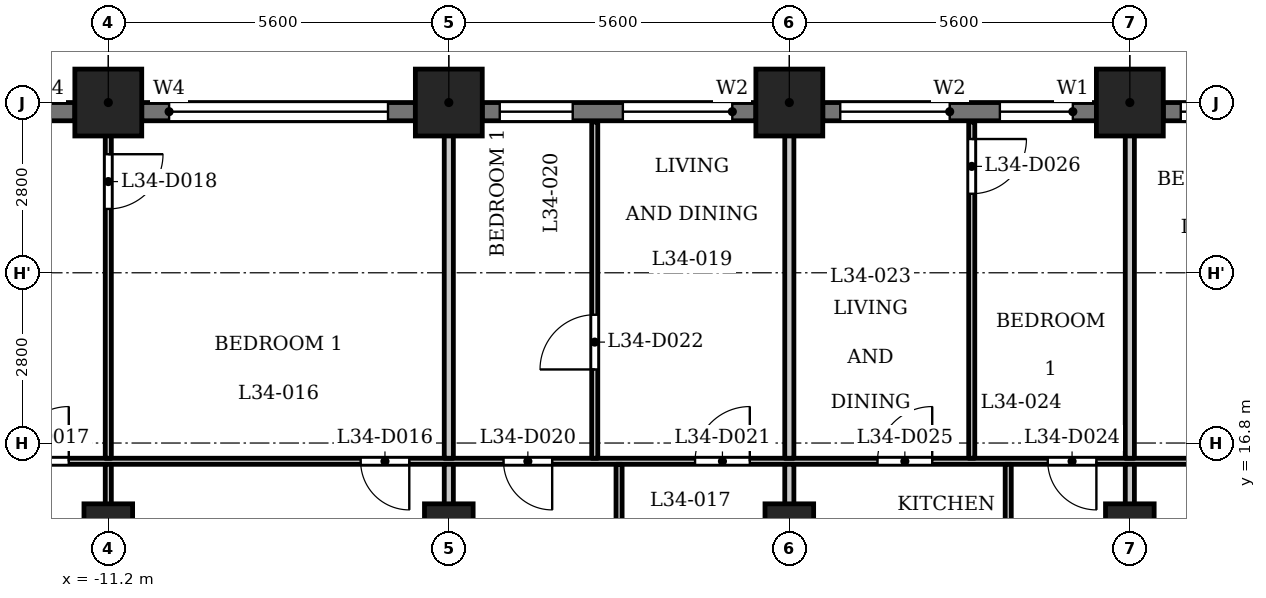
"""IFC4 building model, lengths in metres.
Left out: names, types, materials, properties, quantities, classifications, styles, units other than length and angle.
Written with IfcOpenShell. Run it as: python <this file> out.ifc"""

import sys

from ifc_helpers import new_model, si_unit, direction, frame, frame_2d, origin, origin_2d, place, context, subcontext, project, spatial, rectangle, extrude, element, fill, save


model = new_model("IFC4")
c1 = context("Model", 3, precision=1e-05, world=origin(), true_north=direction((0.0, 1.0)))
c2 = subcontext(c1, "Body", "Model", "MODEL_VIEW")
j1 = project(units=[si_unit("LENGTHUNIT", "METRE"), si_unit("PLANEANGLEUNIT", "RADIAN")], contexts=[c1])
p1 = place(None, origin())
s1 = spatial("IfcSite", under=j1, at=p1, CompositionType="ELEMENT")
p2 = place(p1, origin())
s2 = spatial("IfcBuilding", under=s1, at=p2, CompositionType="ELEMENT")
p3 = place(p2, frame((0.0, 0.0, 136.1)))
s3 = spatial("IfcBuildingStorey", under=s2, at=p3, CompositionType="ELEMENT", Elevation=136.1)
for number, where, z_axis, x_axis in (
    (1, (5.6, 22.4, 0.0), (0.0, 0.0, 1.0), (1.0, 0.0, 0.0)),
    (2, (0.0, 22.4, 0.0), (0.0, 0.0, 1.0), (1.0, 0.0, 0.0)),
    (3, (-5.6, 22.4, 0.0), (0.0, 0.0, 1.0), (1.0, 0.0, 0.0)),
    (4, (-11.2, 22.4, 0.0), (0.0, 0.0, 1.0), (1.0, 0.0, 0.0)),
):
    element("IfcColumn", number, at=place(p3, frame(where, z_axis=z_axis, x_axis=x_axis)), inside=s3, PredefinedType="COLUMN", context=c2, shape_type="SweptSolid", body=[
        extrude(rectangle(XDim=1.1, YDim=1.1, at=origin_2d()), origin(), (0.0, 0.0, 1.0), 3.5),
    ])
for number, where, z_axis, x_axis in (
    (5, (-11.2, 15.4, 0.0), (0.0, 0.0, 1.0), (1.0, 0.0, 0.0)),
    (6, (-5.6, 15.4, 0.0), (0.0, 0.0, 1.0), (1.0, 0.0, 0.0)),
    (7, (0.0, 15.4, 0.0), (0.0, 0.0, 1.0), (1.0, 0.0, 0.0)),
    (8, (5.6, 15.4, 0.0), (0.0, 0.0, 1.0), (1.0, 0.0, 0.0)),
):
    element("IfcColumn", number, at=place(p3, frame(where, z_axis=z_axis, x_axis=x_axis)), inside=s3, PredefinedType="COLUMN", context=c2, shape_type="SweptSolid", body=[
        extrude(rectangle(XDim=0.8, YDim=0.8, at=origin_2d()), origin(), (0.0, 0.0, 1.0), 3.5),
    ])
p4 = place(p3, frame((10.65, 22.25, 0.0), z_axis=(0.0, 0.0, 1.0), x_axis=(-1.0, 0.0, 0.0)))
e9 = element("IfcWall", 9, at=p4, inside=s3, PredefinedType="SOLIDWALL", context=c2, shape_type="SweptSolid", body=[
    extrude(rectangle(XDim=4.5, YDim=0.3, at=frame_2d((2.25, 0.0))), origin(), (0.0, 0.0, 1.0), 2.45),
])
p5 = place(p4, frame((0.387, 0.0, 0.6)))
e10 = element("IfcOpeningElement", 10, at=p5, cuts=e9, PredefinedType="OPENING", context=c2, shape_type="SweptSolid", body=[
    extrude(rectangle(XDim=1.2, YDim=1.55, at=frame_2d((0.6, 0.775))), frame((0.0, 0.16, 0.0), z_axis=(0.0, -1.0, 0.0), x_axis=(1.0, 0.0, 0.0)), (0.0, 0.0, 1.0), 0.32),
])
p6 = place(p4, frame((2.413, 0.0, 0.9)))
e11 = element("IfcOpeningElement", 11, at=p6, cuts=e9, PredefinedType="OPENING", context=c2, shape_type="SweptSolid", body=[
    extrude(rectangle(XDim=1.8, YDim=1.25, at=frame_2d((0.9, 0.625))), frame((0.0, 0.16, 0.0), z_axis=(0.0, -1.0, 0.0), x_axis=(1.0, 0.0, 0.0)), (0.0, 0.0, 1.0), 0.32),
])
p7 = place(p3, frame((5.05, 22.25, 0.0), z_axis=(0.0, 0.0, 1.0), x_axis=(-1.0, 0.0, 0.0)))
e12 = element("IfcWall", 12, at=p7, inside=s3, PredefinedType="SOLIDWALL", context=c2, shape_type="SweptSolid", body=[
    extrude(rectangle(XDim=4.5, YDim=0.3, at=frame_2d((2.25, 0.0))), origin(), (0.0, 0.0, 1.0), 2.45),
])
p8 = place(p7, frame((0.387, 0.0, 0.6)))
e13 = element("IfcOpeningElement", 13, at=p8, cuts=e12, PredefinedType="OPENING", context=c2, shape_type="SweptSolid", body=[
    extrude(rectangle(XDim=1.2, YDim=1.55, at=frame_2d((0.6, 0.775))), frame((0.0, 0.16, 0.0), z_axis=(0.0, -1.0, 0.0), x_axis=(1.0, 0.0, 0.0)), (0.0, 0.0, 1.0), 0.32),
])
p9 = place(p7, frame((2.413, 0.0, 0.9)))
e14 = element("IfcOpeningElement", 14, at=p9, cuts=e12, PredefinedType="OPENING", context=c2, shape_type="SweptSolid", body=[
    extrude(rectangle(XDim=1.8, YDim=1.25, at=frame_2d((0.9, 0.625))), frame((0.0, 0.16, 0.0), z_axis=(0.0, -1.0, 0.0), x_axis=(1.0, 0.0, 0.0)), (0.0, 0.0, 1.0), 0.32),
])
p10 = place(p3, frame((-0.55, 22.25, 0.0), z_axis=(0.0, 0.0, 1.0), x_axis=(-1.0, 0.0, 0.0)))
e15 = element("IfcWall", 15, at=p10, inside=s3, PredefinedType="SOLIDWALL", context=c2, shape_type="SweptSolid", body=[
    extrude(rectangle(XDim=4.5, YDim=0.3, at=frame_2d((2.25, 0.0))), origin(), (0.0, 0.0, 1.0), 2.45),
])
p11 = place(p10, frame((0.387, 0.0, 0.9)))
e16 = element("IfcOpeningElement", 16, at=p11, cuts=e15, PredefinedType="OPENING", context=c2, shape_type="SweptSolid", body=[
    extrude(rectangle(XDim=1.8, YDim=1.25, at=frame_2d((0.9, 0.625))), frame((0.0, 0.16, 0.0), z_axis=(0.0, -1.0, 0.0), x_axis=(1.0, 0.0, 0.0)), (0.0, 0.0, 1.0), 0.32),
])
p12 = place(p10, frame((3.012, 0.0, 0.6)))
e17 = element("IfcOpeningElement", 17, at=p12, cuts=e15, PredefinedType="OPENING", context=c2, shape_type="SweptSolid", body=[
    extrude(rectangle(XDim=1.2, YDim=1.55, at=frame_2d((0.6, 0.775))), frame((0.0, 0.16, 0.0), z_axis=(0.0, -1.0, 0.0), x_axis=(1.0, 0.0, 0.0)), (0.0, 0.0, 1.0), 0.32),
])
p13 = place(p3, frame((-6.15, 22.25, 0.0), z_axis=(0.0, 0.0, 1.0), x_axis=(-1.0, 0.0, 0.0)))
e18 = element("IfcWall", 18, at=p13, inside=s3, PredefinedType="SOLIDWALL", context=c2, shape_type="SweptSolid", body=[
    extrude(rectangle(XDim=4.5, YDim=0.3, at=frame_2d((2.25, 0.0))), origin(), (0.0, 0.0, 1.0), 2.45),
])
p14 = place(p13, frame((0.45, 0.0, 1.2)))
e19 = element("IfcOpeningElement", 19, at=p14, cuts=e18, PredefinedType="OPENING", context=c2, shape_type="SweptSolid", body=[
    extrude(rectangle(XDim=3.6, YDim=0.95, at=frame_2d((1.8, 0.475))), frame((0.0, 0.16, 0.0), z_axis=(0.0, -1.0, 0.0), x_axis=(1.0, 0.0, 0.0)), (0.0, 0.0, 1.0), 0.32),
])
p15 = place(p3, frame((-11.75, 22.25, 0.0), z_axis=(0.0, 0.0, 1.0), x_axis=(-1.0, 0.0, 0.0)))
e20 = element("IfcWall", 20, at=p15, inside=s3, PredefinedType="SOLIDWALL", context=c2, shape_type="SweptSolid", body=[
    extrude(rectangle(XDim=4.5, YDim=0.3, at=frame_2d((2.25, 0.0))), origin(), (0.0, 0.0, 1.0), 2.45),
])
p16 = place(p15, frame((0.45, 0.0, 1.2)))
e21 = element("IfcOpeningElement", 21, at=p16, cuts=e20, PredefinedType="OPENING", context=c2, shape_type="SweptSolid", body=[
    extrude(rectangle(XDim=3.6, YDim=0.95, at=frame_2d((1.8, 0.475))), frame((0.0, 0.16, 0.0), z_axis=(0.0, -1.0, 0.0), x_axis=(1.0, 0.0, 0.0)), (0.0, 0.0, 1.0), 0.32),
])
p17 = place(p3, frame((-16.725, 16.5, 0.0), z_axis=(0.0, 0.0, 1.0), x_axis=(1.0, 0.0, 0.0)))
e22 = element("IfcWall", 22, at=p17, inside=s3, PredefinedType="PARTITIONING", context=c2, shape_type="SweptSolid", body=[
    extrude(rectangle(XDim=33.45, YDim=0.1, at=frame_2d((16.725, 0.0))), origin(), (0.0, 0.0, 1.0), 3.2),
])
p18 = place(p17, frame((9.675, 0.0, 0.0)))
e23 = element("IfcOpeningElement", 23, at=p18, cuts=e22, PredefinedType="OPENING", context=c2, shape_type="SweptSolid", body=[
    extrude(rectangle(XDim=0.8, YDim=2.1, at=frame_2d((0.4, 1.05))), frame((0.0, 0.06, 0.0), z_axis=(0.0, -1.0, 0.0), x_axis=(1.0, 0.0, 0.0)), (0.0, 0.0, 1.0), 0.12),
])
p19 = place(p17, frame((3.975, 0.0, 0.0)))
e24 = element("IfcOpeningElement", 24, at=p19, cuts=e22, PredefinedType="OPENING", context=c2, shape_type="SweptSolid", body=[
    extrude(rectangle(XDim=0.9, YDim=2.1, at=frame_2d((0.45, 1.05))), frame((0.0, 0.06, 0.0), z_axis=(0.0, -1.0, 0.0), x_axis=(1.0, 0.0, 0.0)), (0.0, 0.0, 1.0), 0.12),
])
p20 = place(p17, frame((12.025, 0.0, 0.0)))
e25 = element("IfcOpeningElement", 25, at=p20, cuts=e22, PredefinedType="OPENING", context=c2, shape_type="SweptSolid", body=[
    extrude(rectangle(XDim=0.8, YDim=2.1, at=frame_2d((0.4, 1.05))), frame((0.0, 0.06, 0.0), z_axis=(0.0, -1.0, 0.0), x_axis=(1.0, 0.0, 0.0)), (0.0, 0.0, 1.0), 0.12),
])
p21 = place(p17, frame((15.175, 0.0, 0.0)))
e26 = element("IfcOpeningElement", 26, at=p21, cuts=e22, PredefinedType="OPENING", context=c2, shape_type="SweptSolid", body=[
    extrude(rectangle(XDim=0.9, YDim=2.1, at=frame_2d((0.45, 1.05))), frame((0.0, 0.06, 0.0), z_axis=(0.0, -1.0, 0.0), x_axis=(1.0, 0.0, 0.0)), (0.0, 0.0, 1.0), 0.12),
])
p22 = place(p17, frame((20.975, 0.0, 0.0)))
e27 = element("IfcOpeningElement", 27, at=p22, cuts=e22, PredefinedType="OPENING", context=c2, shape_type="SweptSolid", body=[
    extrude(rectangle(XDim=0.8, YDim=2.1, at=frame_2d((0.4, 1.05))), frame((0.0, 0.06, 0.0), z_axis=(0.0, -1.0, 0.0), x_axis=(1.0, 0.0, 0.0)), (0.0, 0.0, 1.0), 0.12),
])
p23 = place(p17, frame((18.175, 0.0, 0.0)))
e28 = element("IfcOpeningElement", 28, at=p23, cuts=e22, PredefinedType="OPENING", context=c2, shape_type="SweptSolid", body=[
    extrude(rectangle(XDim=0.9, YDim=2.1, at=frame_2d((0.45, 1.05))), frame((0.0, 0.06, 0.0), z_axis=(0.0, -1.0, 0.0), x_axis=(1.0, 0.0, 0.0)), (0.0, 0.0, 1.0), 0.12),
])
p24 = place(p17, frame((23.725, 0.0, 0.0)))
e29 = element("IfcOpeningElement", 29, at=p24, cuts=e22, PredefinedType="OPENING", context=c2, shape_type="SweptSolid", body=[
    extrude(rectangle(XDim=0.8, YDim=2.1, at=frame_2d((0.4, 1.05))), frame((0.0, 0.06, 0.0), z_axis=(0.0, -1.0, 0.0), x_axis=(1.0, 0.0, 0.0)), (0.0, 0.0, 1.0), 0.12),
])
p25 = place(p17, frame((26.125, 0.0, 0.0)))
e30 = element("IfcOpeningElement", 30, at=p25, cuts=e22, PredefinedType="OPENING", context=c2, shape_type="SweptSolid", body=[
    extrude(rectangle(XDim=0.9, YDim=2.1, at=frame_2d((0.45, 1.05))), frame((0.0, 0.06, 0.0), z_axis=(0.0, -1.0, 0.0), x_axis=(1.0, 0.0, 0.0)), (0.0, 0.0, 1.0), 0.12),
])
p26 = place(p17, frame((32.125, 0.0, 0.0)))
e31 = element("IfcOpeningElement", 31, at=p26, cuts=e22, PredefinedType="OPENING", context=c2, shape_type="SweptSolid", body=[
    extrude(rectangle(XDim=0.8, YDim=2.1, at=frame_2d((0.4, 1.05))), frame((0.0, 0.06, 0.0), z_axis=(0.0, -1.0, 0.0), x_axis=(1.0, 0.0, 0.0)), (0.0, 0.0, 1.0), 0.12),
])
p27 = place(p17, frame((28.975, 0.0, 0.0)))
e32 = element("IfcOpeningElement", 32, at=p27, cuts=e22, PredefinedType="OPENING", context=c2, shape_type="SweptSolid", body=[
    extrude(rectangle(XDim=0.9, YDim=2.1, at=frame_2d((0.45, 1.05))), frame((0.0, 0.06, 0.0), z_axis=(0.0, -1.0, 0.0), x_axis=(1.0, 0.0, 0.0)), (0.0, 0.0, 1.0), 0.12),
])
p28 = place(p3, frame((-11.2, 13.275, 0.0), z_axis=(0.0, 0.0, 1.0), x_axis=(0.0, 1.0, 0.0)))
e33 = element("IfcWall", 33, at=p28, inside=s3, PredefinedType="PARTITIONING", context=c2, shape_type="SweptSolid", body=[
    extrude(rectangle(XDim=3.175, YDim=0.1, at=frame_2d((1.587, 0.0))), origin(), (0.0, 0.0, 1.0), 3.2),
])
p29 = place(p3, frame((-11.2, 16.55, 0.0), z_axis=(0.0, 0.0, 1.0), x_axis=(0.0, 1.0, 0.0)))
e34 = element("IfcWall", 34, at=p29, inside=s3, PredefinedType="PARTITIONING", context=c2, shape_type="SweptSolid", body=[
    extrude(rectangle(XDim=6.38, YDim=0.1, at=frame_2d((3.19, 0.0))), origin(), (0.0, 0.0, 1.0), 3.2),
])
p30 = place(p29, frame((4.1, 0.0, 0.0)))
e35 = element("IfcOpeningElement", 35, at=p30, cuts=e34, PredefinedType="OPENING", context=c2, shape_type="SweptSolid", body=[
    extrude(rectangle(XDim=0.9, YDim=2.1, at=frame_2d((0.45, 1.05))), frame((0.0, 0.06, 0.0), z_axis=(0.0, -1.0, 0.0), x_axis=(1.0, 0.0, 0.0)), (0.0, 0.0, 1.0), 0.12),
])
p31 = place(p3, frame((-5.6, 13.275, 0.0), z_axis=(0.0, 0.0, 1.0), x_axis=(0.0, 1.0, 0.0)))
e36 = element("IfcWall", 36, at=p31, inside=s3, PredefinedType="PARTITIONING", context=c2, shape_type="SweptSolid", body=[
    extrude(rectangle(XDim=3.175, YDim=0.15, at=frame_2d((1.587, 0.0))), origin(), (0.0, 0.0, 1.0), 3.2),
])
p32 = place(p3, frame((-5.6, 16.55, 0.0), z_axis=(0.0, 0.0, 1.0), x_axis=(0.0, 1.0, 0.0)))
e37 = element("IfcWall", 37, at=p32, inside=s3, PredefinedType="PARTITIONING", context=c2, shape_type="SweptSolid", body=[
    extrude(rectangle(XDim=6.38, YDim=0.15, at=frame_2d((3.19, 0.0))), origin(), (0.0, 0.0, 1.0), 3.2),
])
p33 = place(p3, frame((-3.2, 16.55, 0.0), z_axis=(0.0, 0.0, 1.0), x_axis=(0.0, 1.0, 0.0)))
e38 = element("IfcWall", 38, at=p33, inside=s3, PredefinedType="PARTITIONING", context=c2, shape_type="SweptSolid", body=[
    extrude(rectangle(XDim=5.53, YDim=0.1, at=frame_2d((2.765, 0.0))), origin(), (0.0, 0.0, 1.0), 3.2),
])
p34 = place(p33, frame((1.46, 0.0, 0.0)))
e39 = element("IfcOpeningElement", 39, at=p34, cuts=e38, PredefinedType="OPENING", context=c2, shape_type="SweptSolid", body=[
    extrude(rectangle(XDim=0.9, YDim=2.1, at=frame_2d((0.45, 1.05))), frame((0.0, 0.06, 0.0), z_axis=(0.0, -1.0, 0.0), x_axis=(1.0, 0.0, 0.0)), (0.0, 0.0, 1.0), 0.12),
])
p35 = place(p3, frame((-2.8, 13.275, 0.0), z_axis=(0.0, 0.0, 1.0), x_axis=(0.0, 1.0, 0.0)))
e40 = element("IfcWall", 40, at=p35, inside=s3, PredefinedType="PARTITIONING", context=c2, shape_type="SweptSolid", body=[
    extrude(rectangle(XDim=3.175, YDim=0.1, at=frame_2d((1.587, 0.0))), origin(), (0.0, 0.0, 1.0), 3.2),
])
p36 = place(p3, frame((0.0, 13.275, 0.0), z_axis=(0.0, 0.0, 1.0), x_axis=(0.0, 1.0, 0.0)))
e41 = element("IfcWall", 41, at=p36, inside=s3, PredefinedType="PARTITIONING", context=c2, shape_type="SweptSolid", body=[
    extrude(rectangle(XDim=3.175, YDim=0.15, at=frame_2d((1.587, 0.0))), origin(), (0.0, 0.0, 1.0), 3.2),
])
p37 = place(p3, frame((0.0, 16.55, 0.0), z_axis=(0.0, 0.0, 1.0), x_axis=(0.0, 1.0, 0.0)))
e42 = element("IfcWall", 42, at=p37, inside=s3, PredefinedType="PARTITIONING", context=c2, shape_type="SweptSolid", body=[
    extrude(rectangle(XDim=6.38, YDim=0.15, at=frame_2d((3.19, 0.0))), origin(), (0.0, 0.0, 1.0), 3.2),
])
p38 = place(p3, frame((3.0, 16.55, 0.0), z_axis=(0.0, 0.0, 1.0), x_axis=(0.0, 1.0, 0.0)))
e43 = element("IfcWall", 43, at=p38, inside=s3, PredefinedType="PARTITIONING", context=c2, shape_type="SweptSolid", body=[
    extrude(rectangle(XDim=5.53, YDim=0.1, at=frame_2d((2.765, 0.0))), origin(), (0.0, 0.0, 1.0), 3.2),
])
p39 = place(p38, frame((4.35, 0.0, 0.0)))
e44 = element("IfcOpeningElement", 44, at=p39, cuts=e43, PredefinedType="OPENING", context=c2, shape_type="SweptSolid", body=[
    extrude(rectangle(XDim=0.9, YDim=2.1, at=frame_2d((0.45, 1.05))), frame((0.0, 0.06, 0.0), z_axis=(0.0, -1.0, 0.0), x_axis=(1.0, 0.0, 0.0)), (0.0, 0.0, 1.0), 0.12),
])
p40 = place(p3, frame((3.6, 13.275, 0.0), z_axis=(0.0, 0.0, 1.0), x_axis=(0.0, 1.0, 0.0)))
e45 = element("IfcWall", 45, at=p40, inside=s3, PredefinedType="PARTITIONING", context=c2, shape_type="SweptSolid", body=[
    extrude(rectangle(XDim=3.175, YDim=0.1, at=frame_2d((1.587, 0.0))), origin(), (0.0, 0.0, 1.0), 3.2),
])
p41 = place(p3, frame((5.6, 13.275, 0.0), z_axis=(0.0, 0.0, 1.0), x_axis=(0.0, 1.0, 0.0)))
e46 = element("IfcWall", 46, at=p41, inside=s3, PredefinedType="PARTITIONING", context=c2, shape_type="SweptSolid", body=[
    extrude(rectangle(XDim=3.175, YDim=0.15, at=frame_2d((1.587, 0.0))), origin(), (0.0, 0.0, 1.0), 3.2),
])
p42 = place(p3, frame((5.6, 16.55, 0.0), z_axis=(0.0, 0.0, 1.0), x_axis=(0.0, 1.0, 0.0)))
e47 = element("IfcWall", 47, at=p42, inside=s3, PredefinedType="PARTITIONING", context=c2, shape_type="SweptSolid", body=[
    extrude(rectangle(XDim=6.38, YDim=0.15, at=frame_2d((3.19, 0.0))), origin(), (0.0, 0.0, 1.0), 3.2),
])
p43 = place(p18, origin())
e48 = element("IfcDoor", 48, at=p43, inside=s3, OperationType="SINGLE_SWING_RIGHT", PredefinedType="DOOR", context=c2, shape_type="SweptSolid", body=[
    extrude(rectangle(XDim=0.8, YDim=2.1, at=frame_2d((0.4, 1.05))), frame((0.0, 0.025, 0.0), z_axis=(0.0, -1.0, 0.0), x_axis=(1.0, 0.0, 0.0)), (0.0, 0.0, 1.0), 0.05),
])
fill(e23, e48)
p44 = place(p19, origin())
e49 = element("IfcDoor", 49, at=p44, inside=s3, OperationType="SINGLE_SWING_LEFT", PredefinedType="DOOR", context=c2, shape_type="SweptSolid", body=[
    extrude(rectangle(XDim=0.9, YDim=2.1, at=frame_2d((0.45, 1.05))), frame((0.0, 0.025, 0.0), z_axis=(0.0, -1.0, 0.0), x_axis=(1.0, 0.0, 0.0)), (0.0, 0.0, 1.0), 0.05),
])
fill(e24, e49)
p45 = place(p30, origin())
e50 = element("IfcDoor", 50, at=p45, inside=s3, OperationType="SINGLE_SWING_RIGHT", PredefinedType="DOOR", context=c2, shape_type="SweptSolid", body=[
    extrude(rectangle(XDim=0.9, YDim=2.1, at=frame_2d((0.45, 1.05))), frame((0.0, 0.025, 0.0), z_axis=(0.0, -1.0, 0.0), x_axis=(1.0, 0.0, 0.0)), (0.0, 0.0, 1.0), 0.05),
])
fill(e35, e50)
p46 = place(p20, origin())
e51 = element("IfcDoor", 51, at=p46, inside=s3, OperationType="SINGLE_SWING_RIGHT", PredefinedType="DOOR", context=c2, shape_type="SweptSolid", body=[
    extrude(rectangle(XDim=0.8, YDim=2.1, at=frame_2d((0.4, 1.05))), frame((0.0, 0.025, 0.0), z_axis=(0.0, -1.0, 0.0), x_axis=(1.0, 0.0, 0.0)), (0.0, 0.0, 1.0), 0.05),
])
fill(e25, e51)
p47 = place(p21, origin())
e52 = element("IfcDoor", 52, at=p47, inside=s3, OperationType="SINGLE_SWING_LEFT", PredefinedType="DOOR", context=c2, shape_type="SweptSolid", body=[
    extrude(rectangle(XDim=0.9, YDim=2.1, at=frame_2d((0.45, 1.05))), frame((0.0, 0.025, 0.0), z_axis=(0.0, -1.0, 0.0), x_axis=(1.0, 0.0, 0.0)), (0.0, 0.0, 1.0), 0.05),
])
fill(e26, e52)
p48 = place(p34, origin())
e53 = element("IfcDoor", 53, at=p48, inside=s3, OperationType="SINGLE_SWING_RIGHT", PredefinedType="DOOR", context=c2, shape_type="SweptSolid", body=[
    extrude(rectangle(XDim=0.9, YDim=2.1, at=frame_2d((0.45, 1.05))), frame((0.0, 0.025, 0.0), z_axis=(0.0, -1.0, 0.0), x_axis=(1.0, 0.0, 0.0)), (0.0, 0.0, 1.0), 0.05),
])
fill(e39, e53)
p49 = place(p22, origin())
e54 = element("IfcDoor", 54, at=p49, inside=s3, OperationType="SINGLE_SWING_RIGHT", PredefinedType="DOOR", context=c2, shape_type="SweptSolid", body=[
    extrude(rectangle(XDim=0.8, YDim=2.1, at=frame_2d((0.4, 1.05))), frame((0.0, 0.025, 0.0), z_axis=(0.0, -1.0, 0.0), x_axis=(1.0, 0.0, 0.0)), (0.0, 0.0, 1.0), 0.05),
])
fill(e27, e54)
p50 = place(p23, origin())
e55 = element("IfcDoor", 55, at=p50, inside=s3, OperationType="SINGLE_SWING_LEFT", PredefinedType="DOOR", context=c2, shape_type="SweptSolid", body=[
    extrude(rectangle(XDim=0.9, YDim=2.1, at=frame_2d((0.45, 1.05))), frame((0.0, 0.025, 0.0), z_axis=(0.0, -1.0, 0.0), x_axis=(1.0, 0.0, 0.0)), (0.0, 0.0, 1.0), 0.05),
])
fill(e28, e55)
p51 = place(p39, origin())
e56 = element("IfcDoor", 56, at=p51, inside=s3, OperationType="SINGLE_SWING_RIGHT", PredefinedType="DOOR", context=c2, shape_type="SweptSolid", body=[
    extrude(rectangle(XDim=0.9, YDim=2.1, at=frame_2d((0.45, 1.05))), frame((0.0, 0.025, 0.0), z_axis=(0.0, -1.0, 0.0), x_axis=(1.0, 0.0, 0.0)), (0.0, 0.0, 1.0), 0.05),
])
fill(e44, e56)
p52 = place(p6, origin())
e57 = element("IfcWindow", 57, at=p52, inside=s3, PartitioningType="SINGLE_PANEL", PredefinedType="WINDOW", context=c2, shape_type="SweptSolid", body=[
    extrude(rectangle(XDim=1.8, YDim=1.25, at=frame_2d((0.9, 0.625))), frame((0.0, 0.03, 0.0), z_axis=(0.0, -1.0, 0.0), x_axis=(1.0, 0.0, 0.0)), (0.0, 0.0, 1.0), 0.06),
])
fill(e11, e57)
p53 = place(p8, origin())
e58 = element("IfcWindow", 58, at=p53, inside=s3, PartitioningType="SINGLE_PANEL", PredefinedType="WINDOW", context=c2, shape_type="SweptSolid", body=[
    extrude(rectangle(XDim=1.2, YDim=1.55, at=frame_2d((0.6, 0.775))), frame((0.0, 0.03, 0.0), z_axis=(0.0, -1.0, 0.0), x_axis=(1.0, 0.0, 0.0)), (0.0, 0.0, 1.0), 0.06),
])
fill(e13, e58)
p54 = place(p9, origin())
e59 = element("IfcWindow", 59, at=p54, inside=s3, PartitioningType="SINGLE_PANEL", PredefinedType="WINDOW", context=c2, shape_type="SweptSolid", body=[
    extrude(rectangle(XDim=1.8, YDim=1.25, at=frame_2d((0.9, 0.625))), frame((0.0, 0.03, 0.0), z_axis=(0.0, -1.0, 0.0), x_axis=(1.0, 0.0, 0.0)), (0.0, 0.0, 1.0), 0.06),
])
fill(e14, e59)
p55 = place(p11, origin())
e60 = element("IfcWindow", 60, at=p55, inside=s3, PartitioningType="SINGLE_PANEL", PredefinedType="WINDOW", context=c2, shape_type="SweptSolid", body=[
    extrude(rectangle(XDim=1.8, YDim=1.25, at=frame_2d((0.9, 0.625))), frame((0.0, 0.03, 0.0), z_axis=(0.0, -1.0, 0.0), x_axis=(1.0, 0.0, 0.0)), (0.0, 0.0, 1.0), 0.06),
])
fill(e16, e60)
p56 = place(p12, origin())
e61 = element("IfcWindow", 61, at=p56, inside=s3, PartitioningType="SINGLE_PANEL", PredefinedType="WINDOW", context=c2, shape_type="SweptSolid", body=[
    extrude(rectangle(XDim=1.2, YDim=1.55, at=frame_2d((0.6, 0.775))), frame((0.0, 0.03, 0.0), z_axis=(0.0, -1.0, 0.0), x_axis=(1.0, 0.0, 0.0)), (0.0, 0.0, 1.0), 0.06),
])
fill(e17, e61)
p57 = place(p14, origin())
e62 = element("IfcWindow", 62, at=p57, inside=s3, PartitioningType="SINGLE_PANEL", PredefinedType="WINDOW", context=c2, shape_type="SweptSolid", body=[
    extrude(rectangle(XDim=3.6, YDim=0.95, at=frame_2d((1.8, 0.475))), frame((0.0, 0.03, 0.0), z_axis=(0.0, -1.0, 0.0), x_axis=(1.0, 0.0, 0.0)), (0.0, 0.0, 1.0), 0.06),
])
fill(e19, e62)
save(model, sys.argv[1])
